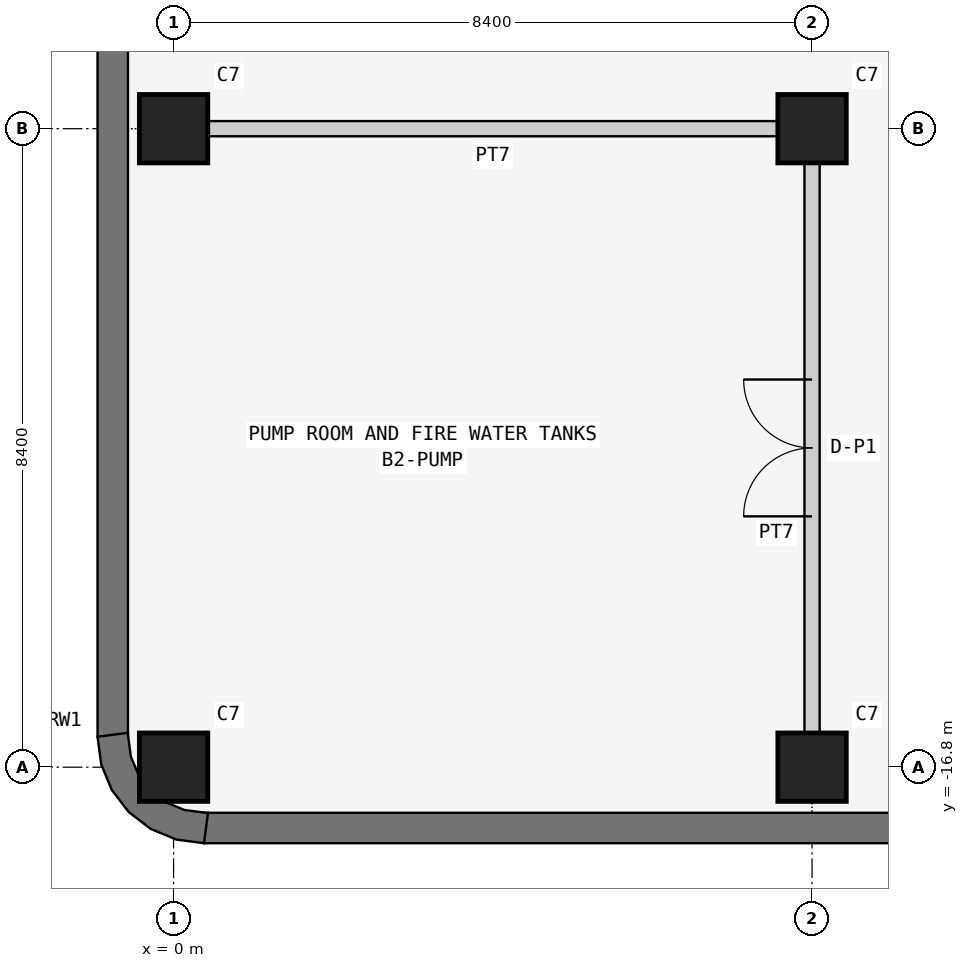
"""IFC4 building model, lengths in metres.
Left out: names, types, materials, properties, quantities, classifications, styles, units other than length and angle.
Written with IfcOpenShell. Run it as: python <this file> out.ifc"""

import sys

from ifc_helpers import new_model, si_unit, direction, frame, frame_2d, origin, origin_2d, place, context, subcontext, project, spatial, polyline, rectangle, outline, extrude, element, fill, save


model = new_model("IFC4")
c1 = context("Model", 3, precision=1e-05, world=origin(), true_north=direction((0.0, 1.0)))
c2 = subcontext(c1, "Body", "Model", "MODEL_VIEW")
j1 = project(units=[si_unit("LENGTHUNIT", "METRE"), si_unit("PLANEANGLEUNIT", "RADIAN")], contexts=[c1])
p1 = place(None, origin())
s1 = spatial("IfcSite", under=j1, at=p1, CompositionType="ELEMENT")
p2 = place(p1, origin())
s2 = spatial("IfcBuilding", under=s1, at=p2, CompositionType="ELEMENT")
p3 = place(p2, frame((0.0, 0.0, -7.2)))
s3 = spatial("IfcBuildingStorey", under=s2, at=p3, CompositionType="ELEMENT", Elevation=-7.2)
for number, where, z_axis, x_axis in (
    (1, (0.0, -16.8, -0.4), (0.0, 0.0, 1.0), (1.0, 0.0, 0.0)),
    (2, (0.0, -8.4, -0.4), (0.0, 0.0, 1.0), (1.0, 0.0, 0.0)),
    (3, (8.4, -16.8, -0.4), (0.0, 0.0, 1.0), (1.0, 0.0, 0.0)),
    (4, (8.4, -8.4, -0.4), (0.0, 0.0, 1.0), (1.0, 0.0, 0.0)),
):
    element("IfcColumn", number, at=place(p3, frame(where, z_axis=z_axis, x_axis=x_axis)), inside=s3, PredefinedType="COLUMN", context=c2, shape_type="SweptSolid", body=[
        extrude(rectangle(XDim=0.9, YDim=0.9, at=origin_2d()), origin(), (0.0, 0.0, 1.0), 4.0),
    ])
p4 = place(p3, frame((-0.8, 58.4, -0.4), z_axis=(0.0, 0.0, 1.0), x_axis=(0.0, -1.0, 0.0)))
e5 = element("IfcWall", 5, at=p4, inside=s3, PredefinedType="SOLIDWALL", context=c2, shape_type="SweptSolid", body=[
    extrude(rectangle(XDim=74.8, YDim=0.4, at=frame_2d((37.4, 0.0))), origin(), (0.0, 0.0, 1.0), 4.0),
])
p5 = place(p3, frame((0.4, -17.6, -0.4), z_axis=(0.0, 0.0, 1.0), x_axis=(1.0, 0.0, 0.0)))
e6 = element("IfcWall", 6, at=p5, inside=s3, PredefinedType="SOLIDWALL", context=c2, shape_type="SweptSolid", body=[
    extrude(rectangle(XDim=58.0, YDim=0.4, at=frame_2d((29.0, 0.0))), origin(), (0.0, 0.0, 1.0), 4.0),
])
p6 = place(p3, frame((0.0, 0.0, -0.4)))
e7 = element("IfcWall", 7, at=p6, inside=s3, PredefinedType="SOLIDWALL", context=c2, shape_type="SweptSolid", body=[
    extrude(outline(polyline([(0.4, -17.8), (0.453, -17.4), (0.426, -17.4), (0.142, -17.363), (-0.098, -17.263), (-0.305, -17.104), (-0.463, -16.898), (-0.562, -16.658), (-0.6, -16.374), (-0.6, -16.347), (-1.0, -16.4), (-0.952, -16.762), (-0.812, -17.1), (-0.59, -17.39), (-0.3, -17.612), (0.038, -17.752), (0.4, -17.8)])), origin(), (0.0, 0.0, 1.0), 4.0),
])
p7 = place(p3, frame((7.95, -8.4, 0.0), z_axis=(0.0, 0.0, 1.0), x_axis=(-1.0, 0.0, 0.0)))
e8 = element("IfcWall", 8, at=p7, inside=s3, PredefinedType="PARTITIONING", context=c2, shape_type="SweptSolid", body=[
    extrude(rectangle(XDim=7.5, YDim=0.2, at=frame_2d((3.75, 0.0))), origin(), (0.0, 0.0, 1.0), 2.438),
])
p8 = place(p3, frame((8.4, -16.35, 0.0), z_axis=(0.0, 0.0, 1.0), x_axis=(0.0, 1.0, 0.0)))
e9 = element("IfcWall", 9, at=p8, inside=s3, PredefinedType="PARTITIONING", context=c2, shape_type="SweptSolid", body=[
    extrude(rectangle(XDim=7.5, YDim=0.2, at=frame_2d((3.75, 0.0))), origin(), (0.0, 0.0, 1.0), 2.438),
])
p9 = place(p8, frame((2.85, 0.0, 0.0)))
e10 = element("IfcOpeningElement", 10, at=p9, cuts=e9, PredefinedType="OPENING", context=c2, shape_type="SweptSolid", body=[
    extrude(rectangle(XDim=1.8, YDim=2.4, at=frame_2d((0.9, 1.2))), frame((0.0, 0.11, 0.0), z_axis=(0.0, -1.0, 0.0), x_axis=(1.0, 0.0, 0.0)), (0.0, 0.0, 1.0), 0.22),
])
p10 = place(p9, origin())
e11 = element("IfcDoor", 11, at=p10, inside=s3, OperationType="DOUBLE_DOOR_SINGLE_SWING", PredefinedType="DOOR", context=c2, shape_type="SweptSolid", body=[
    extrude(rectangle(XDim=1.8, YDim=2.4, at=frame_2d((0.9, 1.2))), frame((0.0, 0.025, 0.0), z_axis=(0.0, -1.0, 0.0), x_axis=(1.0, 0.0, 0.0)), (0.0, 0.0, 1.0), 0.05),
])
fill(e10, e11)
save(model, sys.argv[1])
